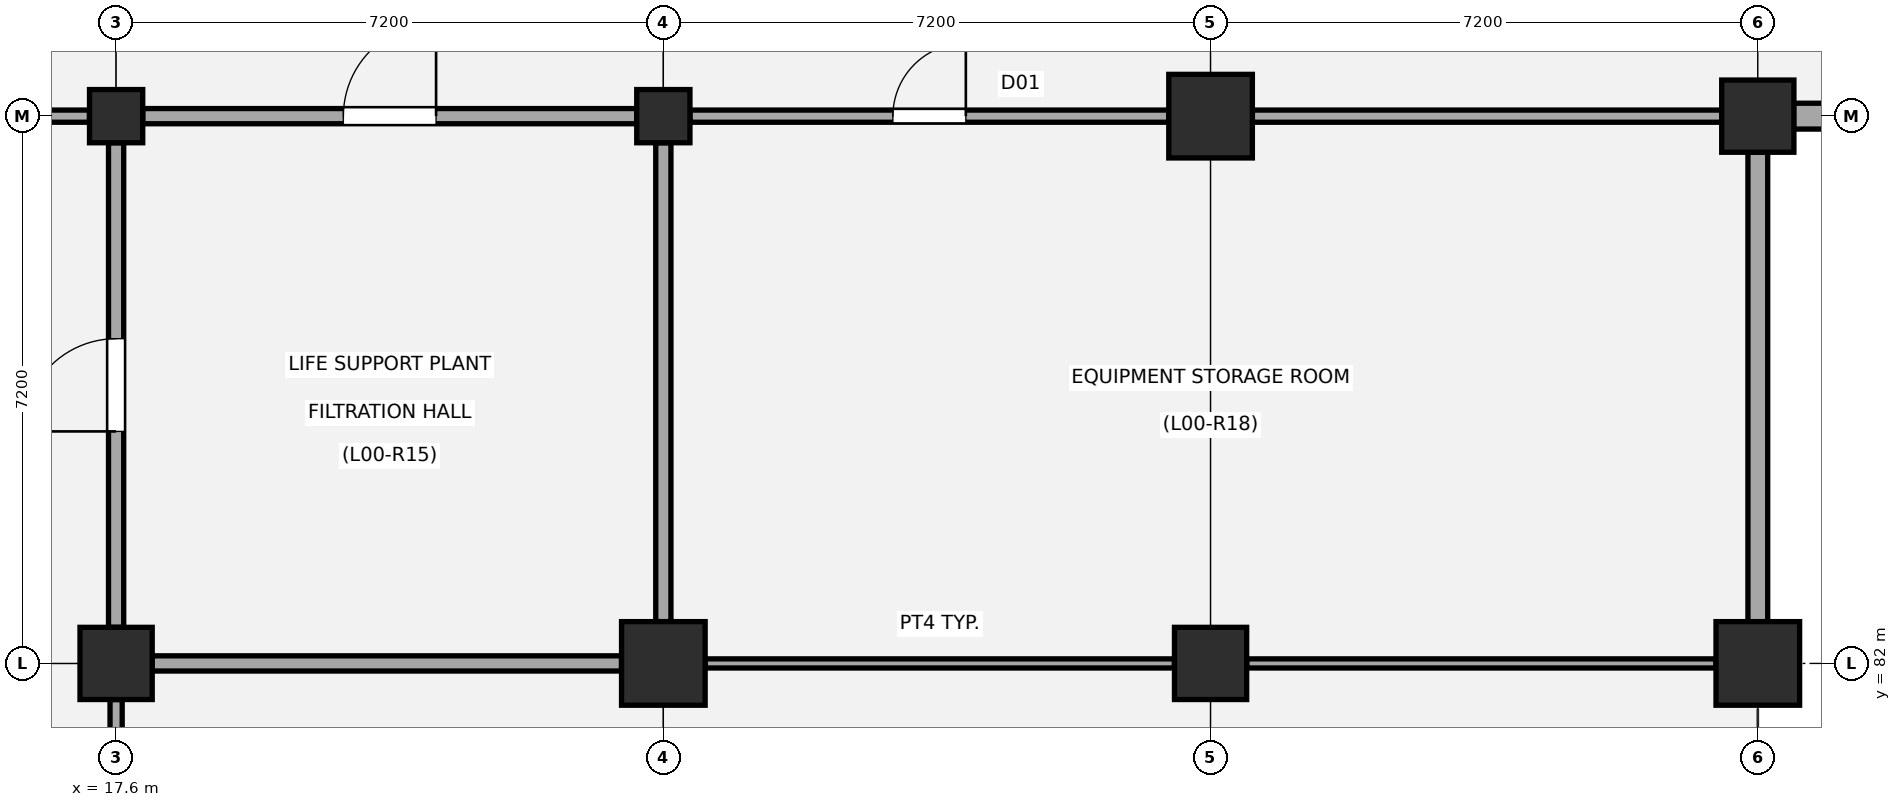
"""IFC4 building model, lengths in metres.
Left out: names, types, materials, properties, quantities, classifications, styles, units other than length and angle.
Written with IfcOpenShell. Run it as: python <this file> out.ifc"""

import sys

from ifc_helpers import new_model, si_unit, direction, frame, frame_2d, origin, origin_2d, place, context, subcontext, project, spatial, rectangle, extrude, element, fill, save


model = new_model("IFC4")
c1 = context("Model", 3, precision=1e-05, world=origin(), true_north=direction((0.0, 1.0)))
c2 = subcontext(c1, "Body", "Model", "MODEL_VIEW")
j1 = project(units=[si_unit("LENGTHUNIT", "METRE"), si_unit("PLANEANGLEUNIT", "RADIAN")], contexts=[c1])
p1 = place(None, origin())
s1 = spatial("IfcSite", under=j1, at=p1, CompositionType="ELEMENT")
p2 = place(p1, origin())
s2 = spatial("IfcBuilding", under=s1, at=p2, CompositionType="ELEMENT")
p3 = place(p2, origin())
s3 = spatial("IfcBuildingStorey", under=s2, at=p3, CompositionType="ELEMENT", Elevation=0.0)
p4 = place(p3, frame((17.6, 82.0, -0.35), z_axis=(0.0, 0.0, 1.0), x_axis=(1.0, 0.0, 0.0)))
e1 = element("IfcColumn", 1, at=p4, inside=s3, PredefinedType="COLUMN", context=c2, shape_type="SweptSolid", body=[
    extrude(rectangle(XDim=0.95, YDim=0.95, at=origin_2d()), origin(), (0.0, 0.0, 1.0), 5.03),
])
p5 = place(p3, frame((17.6, 89.2, -0.35), z_axis=(0.0, 0.0, 1.0), x_axis=(1.0, 0.0, 0.0)))
e2 = element("IfcColumn", 2, at=p5, inside=s3, PredefinedType="COLUMN", context=c2, shape_type="SweptSolid", body=[
    extrude(rectangle(XDim=0.7, YDim=0.7, at=origin_2d()), origin(), (0.0, 0.0, 1.0), 5.03),
])
p6 = place(p3, frame((24.8, 82.0, -0.35), z_axis=(0.0, 0.0, 1.0), x_axis=(1.0, 0.0, 0.0)))
e3 = element("IfcColumn", 3, at=p6, inside=s3, PredefinedType="COLUMN", context=c2, shape_type="SweptSolid", body=[
    extrude(rectangle(XDim=1.1, YDim=1.1, at=origin_2d()), origin(), (0.0, 0.0, 1.0), 5.03),
])
p7 = place(p3, frame((24.8, 89.2, -0.35), z_axis=(0.0, 0.0, 1.0), x_axis=(1.0, 0.0, 0.0)))
e4 = element("IfcColumn", 4, at=p7, inside=s3, PredefinedType="COLUMN", context=c2, shape_type="SweptSolid", body=[
    extrude(rectangle(XDim=0.7, YDim=0.7, at=origin_2d()), origin(), (0.0, 0.0, 1.0), 5.03),
])
p8 = place(p3, frame((32.0, 82.0, -0.35), z_axis=(0.0, 0.0, 1.0), x_axis=(1.0, 0.0, 0.0)))
e5 = element("IfcColumn", 5, at=p8, inside=s3, PredefinedType="COLUMN", context=c2, shape_type="SweptSolid", body=[
    extrude(rectangle(XDim=0.95, YDim=0.95, at=origin_2d()), origin(), (0.0, 0.0, 1.0), 5.03),
])
for number, where, z_axis, x_axis in (
    (6, (32.0, 89.2, -0.35), (0.0, 0.0, 1.0), (1.0, 0.0, 0.0)),
    (7, (39.2, 82.0, -0.35), (0.0, 0.0, 1.0), (1.0, 0.0, 0.0)),
):
    element("IfcColumn", number, at=place(p3, frame(where, z_axis=z_axis, x_axis=x_axis)), inside=s3, PredefinedType="COLUMN", context=c2, shape_type="SweptSolid", body=[
        extrude(rectangle(XDim=1.1, YDim=1.1, at=origin_2d()), origin(), (0.0, 0.0, 1.0), 5.03),
    ])
p9 = place(p3, frame((39.2, 89.2, -0.35), z_axis=(0.0, 0.0, 1.0), x_axis=(1.0, 0.0, 0.0)))
e8 = element("IfcColumn", 8, at=p9, inside=s3, PredefinedType="COLUMN", context=c2, shape_type="SweptSolid", body=[
    extrude(rectangle(XDim=0.95, YDim=0.95, at=origin_2d()), origin(), (0.0, 0.0, 1.0), 5.03),
])
p10 = place(p3, frame((46.055, 89.2, 0.0), z_axis=(0.0, 0.0, 1.0), x_axis=(-1.0, 0.0, 0.0)))
e9 = element("IfcWall", 9, at=p10, inside=s3, PredefinedType="STANDARD", context=c2, shape_type="SweptSolid", body=[
    extrude(rectangle(XDim=6.385, YDim=0.34, at=frame_2d((3.192, 0.0))), origin(), (0.0, 0.0, 1.0), 3.67),
])
p11 = place(p10, frame((2.643, 0.0, 0.95)))
e10 = element("IfcOpeningElement", 10, at=p11, cuts=e9, PredefinedType="OPENING", context=c2, shape_type="SweptSolid", body=[
    extrude(rectangle(XDim=1.1, YDim=1.4, at=frame_2d((0.55, 0.7))), frame((0.0, 0.18, 0.0), z_axis=(0.0, -1.0, 0.0), x_axis=(1.0, 0.0, 0.0)), (0.0, 0.0, 1.0), 0.36),
])
p12 = place(p3, frame((39.2, 88.73, 0.0), z_axis=(0.0, 0.0, 1.0), x_axis=(0.0, -1.0, 0.0)))
e11 = element("IfcWall", 11, at=p12, inside=s3, PredefinedType="STANDARD", context=c2, shape_type="SweptSolid", body=[
    extrude(rectangle(XDim=6.185, YDim=0.26, at=frame_2d((3.093, 0.0))), origin(), (0.0, 0.0, 1.0), 3.67),
])
p13 = place(p3, frame((17.6, 75.35, 0.0), z_axis=(0.0, 0.0, 1.0), x_axis=(0.0, 1.0, 0.0)))
e12 = element("IfcWall", 12, at=p13, inside=s3, PredefinedType="PARTITIONING", context=c2, shape_type="SweptSolid", body=[
    extrude(rectangle(XDim=6.175, YDim=0.16, at=frame_2d((3.087, 0.0))), origin(), (0.0, 0.0, 1.0), 2.47),
])
p14 = place(p13, frame((2.367, 0.0, 0.0)))
e13 = element("IfcOpeningElement", 13, at=p14, cuts=e12, PredefinedType="OPENING", context=c2, shape_type="SweptSolid", body=[
    extrude(rectangle(XDim=1.44, YDim=2.2, at=frame_2d((0.72, 1.1))), frame((0.0, 0.09, 0.0), z_axis=(0.0, -1.0, 0.0), x_axis=(1.0, 0.0, 0.0)), (0.0, 0.0, 1.0), 0.18),
])
p15 = place(p3, frame((17.6, 82.475, 0.0), z_axis=(0.0, 0.0, 1.0), x_axis=(0.0, 1.0, 0.0)))
e14 = element("IfcWall", 14, at=p15, inside=s3, PredefinedType="PARTITIONING", context=c2, shape_type="SweptSolid", body=[
    extrude(rectangle(XDim=6.375, YDim=0.2, at=frame_2d((3.188, 0.0))), origin(), (0.0, 0.0, 1.0), 3.62),
])
p16 = place(p15, frame((2.577, 0.0, 0.0)))
e15 = element("IfcOpeningElement", 15, at=p16, cuts=e14, PredefinedType="OPENING", context=c2, shape_type="SweptSolid", body=[
    extrude(rectangle(XDim=1.22, YDim=2.16, at=frame_2d((0.61, 1.08))), frame((0.0, 0.11, 0.0), z_axis=(0.0, -1.0, 0.0), x_axis=(1.0, 0.0, 0.0)), (0.0, 0.0, 1.0), 0.22),
])
p17 = place(p3, frame((10.75, 89.2, 0.0), z_axis=(0.0, 0.0, 1.0), x_axis=(1.0, 0.0, 0.0)))
e16 = element("IfcWall", 16, at=p17, inside=s3, PredefinedType="PARTITIONING", context=c2, shape_type="SweptSolid", body=[
    extrude(rectangle(XDim=6.5, YDim=0.16, at=frame_2d((3.25, 0.0))), origin(), (0.0, 0.0, 1.0), 3.62),
])
p18 = place(p17, frame((2.32, 0.0, 0.0)))
e17 = element("IfcOpeningElement", 17, at=p18, cuts=e16, PredefinedType="OPENING", context=c2, shape_type="SweptSolid", body=[
    extrude(rectangle(XDim=1.86, YDim=2.26, at=frame_2d((0.93, 1.13))), frame((0.0, 0.09, 0.0), z_axis=(0.0, -1.0, 0.0), x_axis=(1.0, 0.0, 0.0)), (0.0, 0.0, 1.0), 0.18),
])
p19 = place(p3, frame((18.075, 82.0, 0.0), z_axis=(0.0, 0.0, 1.0), x_axis=(1.0, 0.0, 0.0)))
e18 = element("IfcWall", 18, at=p19, inside=s3, PredefinedType="PARTITIONING", context=c2, shape_type="SweptSolid", body=[
    extrude(rectangle(XDim=6.175, YDim=0.2, at=frame_2d((3.087, 0.0))), origin(), (0.0, 0.0, 1.0), 2.37),
])
p20 = place(p3, frame((24.8, 82.55, 0.0), z_axis=(0.0, 0.0, 1.0), x_axis=(0.0, 1.0, 0.0)))
e19 = element("IfcWall", 19, at=p20, inside=s3, PredefinedType="PARTITIONING", context=c2, shape_type="SweptSolid", body=[
    extrude(rectangle(XDim=6.3, YDim=0.2, at=frame_2d((3.15, 0.0))), origin(), (0.0, 0.0, 1.0), 3.62),
])
p21 = place(p3, frame((17.95, 89.2, 0.0), z_axis=(0.0, 0.0, 1.0), x_axis=(1.0, 0.0, 0.0)))
e20 = element("IfcWall", 20, at=p21, inside=s3, PredefinedType="PARTITIONING", context=c2, shape_type="SweptSolid", body=[
    extrude(rectangle(XDim=6.5, YDim=0.2, at=frame_2d((3.25, 0.0))), origin(), (0.0, 0.0, 1.0), 3.52),
])
p22 = place(p21, frame((2.64, 0.0, 0.0)))
e21 = element("IfcOpeningElement", 21, at=p22, cuts=e20, PredefinedType="OPENING", context=c2, shape_type="SweptSolid", body=[
    extrude(rectangle(XDim=1.22, YDim=2.16, at=frame_2d((0.61, 1.08))), frame((0.0, 0.11, 0.0), z_axis=(0.0, -1.0, 0.0), x_axis=(1.0, 0.0, 0.0)), (0.0, 0.0, 1.0), 0.22),
])
p23 = place(p3, frame((25.35, 82.0, 0.0), z_axis=(0.0, 0.0, 1.0), x_axis=(1.0, 0.0, 0.0)))
e22 = element("IfcWall", 22, at=p23, inside=s3, PredefinedType="PARTITIONING", context=c2, shape_type="SweptSolid", body=[
    extrude(rectangle(XDim=6.175, YDim=0.12, at=frame_2d((3.087, 0.0))), origin(), (0.0, 0.0, 1.0), 2.47),
])
p24 = place(p3, frame((25.15, 89.2, 0.0), z_axis=(0.0, 0.0, 1.0), x_axis=(1.0, 0.0, 0.0)))
e23 = element("IfcWall", 23, at=p24, inside=s3, PredefinedType="PARTITIONING", context=c2, shape_type="SweptSolid", body=[
    extrude(rectangle(XDim=6.3, YDim=0.16, at=frame_2d((3.15, 0.0))), origin(), (0.0, 0.0, 1.0), 3.62),
])
p25 = place(p24, frame((2.67, 0.0, 0.0)))
e24 = element("IfcOpeningElement", 24, at=p25, cuts=e23, PredefinedType="OPENING", context=c2, shape_type="SweptSolid", body=[
    extrude(rectangle(XDim=0.96, YDim=2.1, at=frame_2d((0.48, 1.05))), frame((0.0, 0.09, 0.0), z_axis=(0.0, -1.0, 0.0), x_axis=(1.0, 0.0, 0.0)), (0.0, 0.0, 1.0), 0.18),
])
p26 = place(p3, frame((32.475, 82.0, 0.0), z_axis=(0.0, 0.0, 1.0), x_axis=(1.0, 0.0, 0.0)))
e25 = element("IfcWall", 25, at=p26, inside=s3, PredefinedType="PARTITIONING", context=c2, shape_type="SweptSolid", body=[
    extrude(rectangle(XDim=6.175, YDim=0.12, at=frame_2d((3.087, 0.0))), origin(), (0.0, 0.0, 1.0), 2.37),
])
p27 = place(p3, frame((32.55, 89.2, 0.0), z_axis=(0.0, 0.0, 1.0), x_axis=(1.0, 0.0, 0.0)))
e26 = element("IfcWall", 26, at=p27, inside=s3, PredefinedType="PARTITIONING", context=c2, shape_type="SweptSolid", body=[
    extrude(rectangle(XDim=6.175, YDim=0.16, at=frame_2d((3.087, 0.0))), origin(), (0.0, 0.0, 1.0), 3.52),
])
p28 = place(p16, origin())
e27 = element("IfcDoor", 27, at=p28, inside=s3, OperationType="SINGLE_SWING_LEFT", PredefinedType="DOOR", context=c2, shape_type="SweptSolid", body=[
    extrude(rectangle(XDim=1.22, YDim=2.16, at=frame_2d((0.61, 1.08))), frame((0.0, 0.025, 0.0), z_axis=(0.0, -1.0, 0.0), x_axis=(1.0, 0.0, 0.0)), (0.0, 0.0, 1.0), 0.05),
])
fill(e15, e27)
p29 = place(p22, origin())
e28 = element("IfcDoor", 28, at=p29, inside=s3, OperationType="SINGLE_SWING_RIGHT", PredefinedType="DOOR", context=c2, shape_type="SweptSolid", body=[
    extrude(rectangle(XDim=1.22, YDim=2.16, at=frame_2d((0.61, 1.08))), frame((0.0, 0.025, 0.0), z_axis=(0.0, -1.0, 0.0), x_axis=(1.0, 0.0, 0.0)), (0.0, 0.0, 1.0), 0.05),
])
fill(e21, e28)
p30 = place(p25, origin())
e29 = element("IfcDoor", 29, at=p30, inside=s3, OperationType="SINGLE_SWING_RIGHT", PredefinedType="DOOR", context=c2, shape_type="SweptSolid", body=[
    extrude(rectangle(XDim=0.96, YDim=2.1, at=frame_2d((0.48, 1.05))), frame((0.0, 0.025, 0.0), z_axis=(0.0, -1.0, 0.0), x_axis=(1.0, 0.0, 0.0)), (0.0, 0.0, 1.0), 0.05),
])
fill(e24, e29)
save(model, sys.argv[1])
